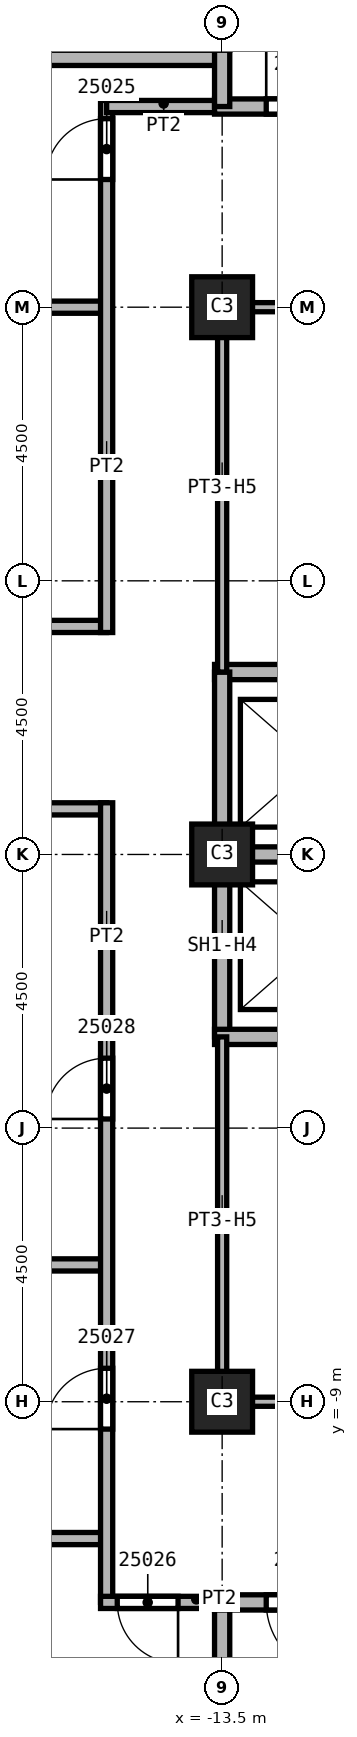
"""IFC4 building model, lengths in metres.
Left out: names, types, materials, properties, quantities, classifications, styles, units other than length and angle.
Written with IfcOpenShell. Run it as: python <this file> out.ifc"""

import sys

from ifc_helpers import new_model, si_unit, direction, frame, frame_2d, origin, origin_2d, place, context, subcontext, project, spatial, rectangle, extrude, element, fill, save


model = new_model("IFC4")
c1 = context("Model", 3, precision=1e-05, world=origin(), true_north=direction((0.0, 1.0)))
c2 = subcontext(c1, "Body", "Model", "MODEL_VIEW")
j1 = project(units=[si_unit("LENGTHUNIT", "METRE"), si_unit("PLANEANGLEUNIT", "RADIAN")], contexts=[c1])
p1 = place(None, origin())
s1 = spatial("IfcSite", under=j1, at=p1, CompositionType="ELEMENT")
p2 = place(p1, origin())
s2 = spatial("IfcBuilding", under=s1, at=p2, CompositionType="ELEMENT")
p3 = place(p2, frame((0.0, 0.0, 60.0)))
s3 = spatial("IfcBuildingStorey", under=s2, at=p3, CompositionType="ELEMENT", Elevation=60.0)
for number, where, z_axis, x_axis in (
    (1, (-13.5, 0.0, 0.0), (0.0, 0.0, 1.0), (1.0, 0.0, 0.0)),
    (2, (-13.5, 9.0, 0.0), (0.0, 0.0, 1.0), (1.0, 0.0, 0.0)),
    (3, (-13.5, -9.0, 0.0), (0.0, 0.0, 1.0), (1.0, 0.0, 0.0)),
):
    element("IfcColumn", number, at=place(p3, frame(where, z_axis=z_axis, x_axis=x_axis)), inside=s3, PredefinedType="COLUMN", context=c2, shape_type="SweptSolid", body=[
        extrude(rectangle(XDim=1.0, YDim=1.0, at=origin_2d()), origin(), (0.0, 0.0, 1.0), 7.7),
    ])
p4 = place(p3, frame((-36.125, 3.75, 0.0), z_axis=(0.0, 0.0, 1.0), x_axis=(1.0, 0.0, 0.0)))
e4 = element("IfcWall", 4, at=p4, inside=s3, PredefinedType="PARTITIONING", context=c2, shape_type="SweptSolid", body=[
    extrude(rectangle(XDim=20.725, YDim=0.2, at=frame_2d((10.363, 0.0))), origin(), (0.0, 0.0, 1.0), 7.7),
])
p5 = place(p4, frame((17.075, 0.0, 0.0)))
e5 = element("IfcOpeningElement", 5, at=p5, cuts=e4, PredefinedType="OPENING", context=c2, shape_type="SweptSolid", body=[
    extrude(rectangle(XDim=1.0, YDim=2.1, at=frame_2d((0.5, 1.05))), frame((0.0, 0.1, 0.0), z_axis=(0.0, -1.0, 0.0), x_axis=(1.0, 0.0, 0.0)), (0.0, 0.0, 1.0), 0.2),
])
p6 = place(p4, frame((0.55, 0.0, 0.0)))
e6 = element("IfcOpeningElement", 6, at=p6, cuts=e4, PredefinedType="OPENING", context=c2, shape_type="SweptSolid", body=[
    extrude(rectangle(XDim=1.0, YDim=2.1, at=frame_2d((0.5, 1.05))), frame((0.0, 0.1, 0.0), z_axis=(0.0, -1.0, 0.0), x_axis=(1.0, 0.0, 0.0)), (0.0, 0.0, 1.0), 0.2),
])
p7 = place(p3, frame((-15.4, 0.75, 0.0), z_axis=(0.0, 0.0, 1.0), x_axis=(-1.0, 0.0, 0.0)))
e7 = element("IfcWall", 7, at=p7, inside=s3, PredefinedType="PARTITIONING", context=c2, shape_type="SweptSolid", body=[
    extrude(rectangle(XDim=20.725, YDim=0.2, at=frame_2d((10.363, 0.0))), origin(), (0.0, 0.0, 1.0), 7.7),
])
p8 = place(p7, frame((19.4, 0.0, 0.0)))
e8 = element("IfcOpeningElement", 8, at=p8, cuts=e7, PredefinedType="OPENING", context=c2, shape_type="SweptSolid", body=[
    extrude(rectangle(XDim=1.0, YDim=2.1, at=frame_2d((0.5, 1.05))), frame((0.0, 0.1, 0.0), z_axis=(0.0, -1.0, 0.0), x_axis=(1.0, 0.0, 0.0)), (0.0, 0.0, 1.0), 0.2),
])
p9 = place(p7, frame((12.65, 0.0, 0.0)))
e9 = element("IfcOpeningElement", 9, at=p9, cuts=e7, PredefinedType="OPENING", context=c2, shape_type="SweptSolid", body=[
    extrude(rectangle(XDim=1.0, YDim=2.1, at=frame_2d((0.5, 1.05))), frame((0.0, 0.1, 0.0), z_axis=(0.0, -1.0, 0.0), x_axis=(1.0, 0.0, 0.0)), (0.0, 0.0, 1.0), 0.2),
])
for number, where, z_axis, x_axis in (
    (10, (-27.1, -11.25, 0.0), (0.0, 0.0, 1.0), (1.0, 0.0, 0.0)),
    (11, (-27.1, -6.75, 0.0), (0.0, 0.0, 1.0), (1.0, 0.0, 0.0)),
    (12, (-27.1, 9.0, 0.0), (0.0, 0.0, 1.0), (1.0, 0.0, 0.0)),
):
    element("IfcWall", number, at=place(p3, frame(where, z_axis=z_axis, x_axis=x_axis)), inside=s3, PredefinedType="PARTITIONING", context=c2, shape_type="SweptSolid", body=[
        extrude(rectangle(XDim=11.7, YDim=0.2, at=frame_2d((5.85, 0.0))), origin(), (0.0, 0.0, 1.0), 7.7),
    ])
p10 = place(p3, frame((-15.4, -12.3, 0.0), z_axis=(0.0, 0.0, 1.0), x_axis=(0.0, 1.0, 0.0)))
e13 = element("IfcWall", 13, at=p10, inside=s3, PredefinedType="PARTITIONING", context=c2, shape_type="SweptSolid", body=[
    extrude(rectangle(XDim=13.15, YDim=0.2, at=frame_2d((6.575, 0.0))), origin(), (0.0, 0.0, 1.0), 7.7),
])
p11 = place(p10, frame((2.85, 0.0, 0.0)))
e14 = element("IfcOpeningElement", 14, at=p11, cuts=e13, PredefinedType="OPENING", context=c2, shape_type="SweptSolid", body=[
    extrude(rectangle(XDim=1.0, YDim=2.1, at=frame_2d((0.5, 1.05))), frame((0.0, 0.1, 0.0), z_axis=(0.0, -1.0, 0.0), x_axis=(1.0, 0.0, 0.0)), (0.0, 0.0, 1.0), 0.2),
])
p12 = place(p10, frame((7.95, 0.0, 0.0)))
e15 = element("IfcOpeningElement", 15, at=p12, cuts=e13, PredefinedType="OPENING", context=c2, shape_type="SweptSolid", body=[
    extrude(rectangle(XDim=1.0, YDim=2.1, at=frame_2d((0.5, 1.05))), frame((0.0, 0.1, 0.0), z_axis=(0.0, -1.0, 0.0), x_axis=(1.0, 0.0, 0.0)), (0.0, 0.0, 1.0), 0.2),
])
p13 = place(p3, frame((-15.4, 3.65, 0.0), z_axis=(0.0, 0.0, 1.0), x_axis=(0.0, 1.0, 0.0)))
e16 = element("IfcWall", 16, at=p13, inside=s3, PredefinedType="PARTITIONING", context=c2, shape_type="SweptSolid", body=[
    extrude(rectangle(XDim=8.75, YDim=0.2, at=frame_2d((4.375, 0.0))), origin(), (0.0, 0.0, 1.0), 7.7),
])
p14 = place(p13, frame((7.45, 0.0, 0.0)))
e17 = element("IfcOpeningElement", 17, at=p14, cuts=e16, PredefinedType="OPENING", context=c2, shape_type="SweptSolid", body=[
    extrude(rectangle(XDim=1.0, YDim=2.1, at=frame_2d((0.5, 1.05))), frame((0.0, 0.1, 0.0), z_axis=(0.0, -1.0, 0.0), x_axis=(1.0, 0.0, 0.0)), (0.0, 0.0, 1.0), 0.2),
])
p15 = place(p3, frame((-15.4, 12.3, 0.0), z_axis=(0.0, 0.0, 1.0), x_axis=(1.0, 0.0, 0.0)))
e18 = element("IfcWall", 18, at=p15, inside=s3, PredefinedType="PARTITIONING", context=c2, shape_type="SweptSolid", body=[
    extrude(rectangle(XDim=2.025, YDim=0.2, at=frame_2d((1.012, 0.0))), origin(), (0.0, 0.0, 1.0), 7.7),
])
p16 = place(p3, frame((-13.375, -12.3, 0.0), z_axis=(0.0, 0.0, 1.0), x_axis=(-1.0, 0.0, 0.0)))
e19 = element("IfcWall", 19, at=p16, inside=s3, PredefinedType="PARTITIONING", context=c2, shape_type="SweptSolid", body=[
    extrude(rectangle(XDim=2.125, YDim=0.2, at=frame_2d((1.062, 0.0))), origin(), (0.0, 0.0, 1.0), 7.7),
])
p17 = place(p16, frame((0.85, 0.0, 0.0)))
e20 = element("IfcOpeningElement", 20, at=p17, cuts=e19, PredefinedType="OPENING", context=c2, shape_type="SweptSolid", body=[
    extrude(rectangle(XDim=1.0, YDim=2.1, at=frame_2d((0.5, 1.05))), frame((0.0, 0.1, 0.0), z_axis=(0.0, -1.0, 0.0), x_axis=(1.0, 0.0, 0.0)), (0.0, 0.0, 1.0), 0.2),
])
p18 = place(p3, frame((-13.5, 13.1, 0.0), z_axis=(0.0, 0.0, 1.0), x_axis=(-1.0, 0.0, 0.0)))
e21 = element("IfcWall", 21, at=p18, inside=s3, PredefinedType="SOLIDWALL", context=c2, shape_type="SweptSolid", body=[
    extrude(rectangle(XDim=24.025, YDim=0.25, at=frame_2d((12.012, 0.0))), origin(), (0.0, 0.0, 1.0), 7.7),
])
p19 = place(p3, frame((-13.625, 0.0, 0.0), z_axis=(0.0, 0.0, 1.0), x_axis=(1.0, 0.0, 0.0)))
e22 = element("IfcWall", 22, at=p19, inside=s3, PredefinedType="SOLIDWALL", context=c2, shape_type="SweptSolid", body=[
    extrude(rectangle(XDim=3.125, YDim=0.25, at=frame_2d((1.562, 0.0))), origin(), (0.0, 0.0, 1.0), 7.7),
])
p20 = place(p3, frame((-13.625, 3.0, 0.0), z_axis=(0.0, 0.0, 1.0), x_axis=(1.0, 0.0, 0.0)))
e23 = element("IfcWall", 23, at=p20, inside=s3, PredefinedType="SOLIDWALL", context=c2, shape_type="SweptSolid", body=[
    extrude(rectangle(XDim=6.125, YDim=0.25, at=frame_2d((3.062, 0.0))), origin(), (0.0, 0.0, 1.0), 7.7),
])
p21 = place(p20, frame((3.25, 0.0, 0.0)))
e24 = element("IfcOpeningElement", 24, at=p21, cuts=e23, PredefinedType="OPENING", context=c2, shape_type="SweptSolid", body=[
    extrude(rectangle(XDim=1.1, YDim=2.1, at=frame_2d((0.55, 1.05))), frame((0.0, 0.125, 0.0), z_axis=(0.0, -1.0, 0.0), x_axis=(1.0, 0.0, 0.0)), (0.0, 0.0, 1.0), 0.25),
])
p22 = place(p3, frame((-13.5, -3.0, 0.0), z_axis=(0.0, 0.0, 1.0), x_axis=(0.0, 1.0, 0.0)))
e25 = element("IfcWall", 25, at=p22, inside=s3, PredefinedType="SOLIDWALL", context=c2, shape_type="SweptSolid", body=[
    extrude(rectangle(XDim=6.0, YDim=0.25, at=frame_2d((3.0, 0.0))), origin(), (0.0, 0.0, 1.0), 6.938),
])
p23 = place(p3, frame((-13.625, -3.0, 0.0), z_axis=(0.0, 0.0, 1.0), x_axis=(1.0, 0.0, 0.0)))
e26 = element("IfcWall", 26, at=p23, inside=s3, PredefinedType="SOLIDWALL", context=c2, shape_type="SweptSolid", body=[
    extrude(rectangle(XDim=9.25, YDim=0.25, at=frame_2d((4.625, 0.0))), origin(), (0.0, 0.0, 1.0), 7.7),
])
p24 = place(p23, frame((3.25, 0.0, 0.0)))
e27 = element("IfcOpeningElement", 27, at=p24, cuts=e26, PredefinedType="OPENING", context=c2, shape_type="SweptSolid", body=[
    extrude(rectangle(XDim=1.1, YDim=2.1, at=frame_2d((0.55, 1.05))), frame((0.0, 0.125, 0.0), z_axis=(0.0, -1.0, 0.0), x_axis=(1.0, 0.0, 0.0)), (0.0, 0.0, 1.0), 0.25),
])
p25 = place(p3, frame((-13.625, 12.3, 0.0), z_axis=(0.0, 0.0, 1.0), x_axis=(1.0, 0.0, 0.0)))
e28 = element("IfcWall", 28, at=p25, inside=s3, PredefinedType="SOLIDWALL", context=c2, shape_type="SweptSolid", body=[
    extrude(rectangle(XDim=9.25, YDim=0.25, at=frame_2d((4.625, 0.0))), origin(), (0.0, 0.0, 1.0), 7.7),
])
p26 = place(p25, frame((0.85, 0.0, 0.0)))
e29 = element("IfcOpeningElement", 29, at=p26, cuts=e28, PredefinedType="OPENING", context=c2, shape_type="SweptSolid", body=[
    extrude(rectangle(XDim=1.2, YDim=2.1, at=frame_2d((0.6, 1.05))), frame((0.0, 0.125, 0.0), z_axis=(0.0, -1.0, 0.0), x_axis=(1.0, 0.0, 0.0)), (0.0, 0.0, 1.0), 0.25),
])
p27 = place(p3, frame((-13.5, -16.925, 0.0), z_axis=(0.0, 0.0, 1.0), x_axis=(0.0, 1.0, 0.0)))
e30 = element("IfcWall", 30, at=p27, inside=s3, PredefinedType="SOLIDWALL", context=c2, shape_type="SweptSolid", body=[
    extrude(rectangle(XDim=4.625, YDim=0.25, at=frame_2d((2.312, 0.0))), origin(), (0.0, 0.0, 1.0), 7.7),
])
p28 = place(p3, frame((-13.5, 12.3, 0.0), z_axis=(0.0, 0.0, 1.0), x_axis=(0.0, 1.0, 0.0)))
e31 = element("IfcWall", 31, at=p28, inside=s3, PredefinedType="SOLIDWALL", context=c2, shape_type="SweptSolid", body=[
    extrude(rectangle(XDim=4.5, YDim=0.25, at=frame_2d((2.25, 0.0))), origin(), (0.0, 0.0, 1.0), 7.7),
])
p29 = place(p28, frame((0.925, 0.0, 0.0)))
e32 = element("IfcOpeningElement", 32, at=p29, cuts=e31, PredefinedType="OPENING", context=c2, shape_type="SweptSolid", body=[
    extrude(rectangle(XDim=1.8, YDim=2.1, at=frame_2d((0.9, 1.05))), frame((0.0, 0.125, 0.0), z_axis=(0.0, -1.0, 0.0), x_axis=(1.0, 0.0, 0.0)), (0.0, 0.0, 1.0), 0.25),
])
p30 = place(p3, frame((-4.375, -12.3, 0.0), z_axis=(0.0, 0.0, 1.0), x_axis=(-1.0, 0.0, 0.0)))
e33 = element("IfcWall", 33, at=p30, inside=s3, PredefinedType="SOLIDWALL", context=c2, shape_type="SweptSolid", body=[
    extrude(rectangle(XDim=9.25, YDim=0.25, at=frame_2d((4.625, 0.0))), origin(), (0.0, 0.0, 1.0), 7.7),
])
p31 = place(p30, frame((7.2, 0.0, 0.0)))
e34 = element("IfcOpeningElement", 34, at=p31, cuts=e33, PredefinedType="OPENING", context=c2, shape_type="SweptSolid", body=[
    extrude(rectangle(XDim=1.2, YDim=2.1, at=frame_2d((0.6, 1.05))), frame((0.0, 0.125, 0.0), z_axis=(0.0, -1.0, 0.0), x_axis=(1.0, 0.0, 0.0)), (0.0, 0.0, 1.0), 0.25),
])
for number, where, z_axis, x_axis in (
    (35, (-13.5, -9.075, 0.0), (0.0, 0.0, 1.0), (0.0, 1.0, 0.0)),
    (36, (-13.5, 3.0, 0.0), (0.0, 0.0, 1.0), (0.0, 1.0, 0.0)),
):
    element("IfcWall", number, at=place(p3, frame(where, z_axis=z_axis, x_axis=x_axis)), inside=s3, PredefinedType="PARTITIONING", context=c2, shape_type="SweptSolid", body=[
        extrude(rectangle(XDim=6.075, YDim=0.15, at=frame_2d((3.038, 0.0))), origin(), (0.0, 0.0, 1.0), 6.938),
    ])
for number, where, z_axis, x_axis in (
    (37, (-13.5, 9.0, 0.0), (0.0, 0.0, 1.0), (1.0, 0.0, 0.0)),
    (38, (-10.5, -9.0, 0.0), (0.0, 0.0, 1.0), (-1.0, 0.0, 0.0)),
):
    element("IfcWall", number, at=place(p3, frame(where, z_axis=z_axis, x_axis=x_axis)), inside=s3, PredefinedType="PARTITIONING", context=c2, shape_type="SweptSolid", body=[
        extrude(rectangle(XDim=3.0, YDim=0.15, at=frame_2d((1.5, 0.0))), origin(), (0.0, 0.0, 1.0), 6.938),
    ])
p32 = place(p26, origin())
e39 = element("IfcDoor", 39, at=p32, inside=s3, OperationType="SINGLE_SWING_LEFT", PredefinedType="DOOR", context=c2, shape_type="SweptSolid", body=[
    extrude(rectangle(XDim=1.2, YDim=2.1, at=frame_2d((0.6, 1.05))), frame((0.0, 0.025, 0.0), z_axis=(0.0, -1.0, 0.0), x_axis=(1.0, 0.0, 0.0)), (0.0, 0.0, 1.0), 0.05),
])
fill(e29, e39)
p33 = place(p31, origin())
e40 = element("IfcDoor", 40, at=p33, inside=s3, OperationType="SINGLE_SWING_RIGHT", PredefinedType="DOOR", context=c2, shape_type="SweptSolid", body=[
    extrude(rectangle(XDim=1.2, YDim=2.1, at=frame_2d((0.6, 1.05))), frame((0.0, 0.025, 0.0), z_axis=(0.0, -1.0, 0.0), x_axis=(1.0, 0.0, 0.0)), (0.0, 0.0, 1.0), 0.05),
])
fill(e34, e40)
p34 = place(p14, origin())
e41 = element("IfcDoor", 41, at=p34, inside=s3, OperationType="SINGLE_SWING_RIGHT", PredefinedType="DOOR", context=c2, shape_type="SweptSolid", body=[
    extrude(rectangle(XDim=1.0, YDim=2.1, at=frame_2d((0.5, 1.05))), frame((0.0, 0.025, 0.0), z_axis=(0.0, -1.0, 0.0), x_axis=(1.0, 0.0, 0.0)), (0.0, 0.0, 1.0), 0.05),
])
fill(e17, e41)
p35 = place(p17, origin())
e42 = element("IfcDoor", 42, at=p35, inside=s3, OperationType="SINGLE_SWING_LEFT", PredefinedType="DOOR", context=c2, shape_type="SweptSolid", body=[
    extrude(rectangle(XDim=1.0, YDim=2.1, at=frame_2d((0.5, 1.05))), frame((0.0, 0.025, 0.0), z_axis=(0.0, -1.0, 0.0), x_axis=(1.0, 0.0, 0.0)), (0.0, 0.0, 1.0), 0.05),
])
fill(e20, e42)
p36 = place(p11, origin())
e43 = element("IfcDoor", 43, at=p36, inside=s3, OperationType="SINGLE_SWING_RIGHT", PredefinedType="DOOR", context=c2, shape_type="SweptSolid", body=[
    extrude(rectangle(XDim=1.0, YDim=2.1, at=frame_2d((0.5, 1.05))), frame((0.0, 0.025, 0.0), z_axis=(0.0, -1.0, 0.0), x_axis=(1.0, 0.0, 0.0)), (0.0, 0.0, 1.0), 0.05),
])
fill(e14, e43)
p37 = place(p12, origin())
e44 = element("IfcDoor", 44, at=p37, inside=s3, OperationType="SINGLE_SWING_LEFT", PredefinedType="DOOR", context=c2, shape_type="SweptSolid", body=[
    extrude(rectangle(XDim=1.0, YDim=2.1, at=frame_2d((0.5, 1.05))), frame((0.0, 0.025, 0.0), z_axis=(0.0, -1.0, 0.0), x_axis=(1.0, 0.0, 0.0)), (0.0, 0.0, 1.0), 0.05),
])
fill(e15, e44)
save(model, sys.argv[1])
